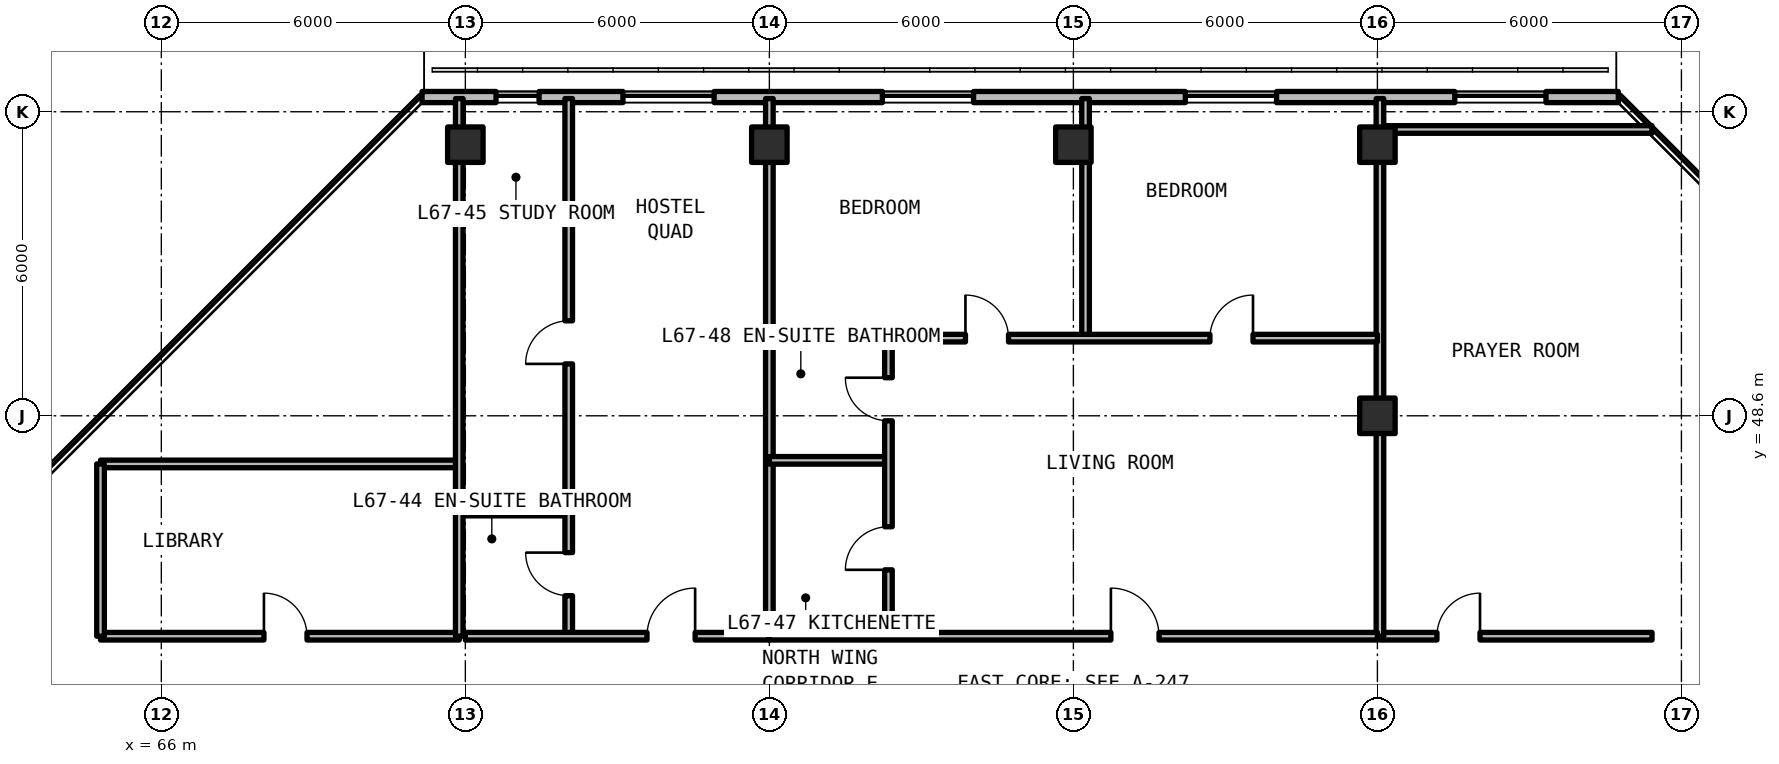
"""IFC4 building model, lengths in metres.
Left out: names, types, materials, properties, quantities, classifications, styles, units other than length and angle.
Written with IfcOpenShell. Run it as: python <this file> out.ifc"""

import sys

from ifc_helpers import new_model, si_unit, direction, frame, frame_2d, origin, origin_2d, place, context, subcontext, project, spatial, rectangle, extrude, element, fill, save


model = new_model("IFC4")
c1 = context("Model", 3, precision=1e-05, world=origin(), true_north=direction((0.0, 1.0)))
c2 = subcontext(c1, "Body", "Model", "MODEL_VIEW")
j1 = project(units=[si_unit("LENGTHUNIT", "METRE"), si_unit("PLANEANGLEUNIT", "RADIAN")], contexts=[c1])
p1 = place(None, origin())
s1 = spatial("IfcSite", under=j1, at=p1, CompositionType="ELEMENT")
p2 = place(p1, origin())
s2 = spatial("IfcBuilding", under=s1, at=p2, CompositionType="ELEMENT")
p3 = place(p2, frame((0.0, 0.0, 239.25)))
s3 = spatial("IfcBuildingStorey", under=s2, at=p3, CompositionType="ELEMENT", Elevation=239.25)
for number, where, z_axis, x_axis in (
    (1, (90.0, 48.6, 0.0), (0.0, 0.0, 1.0), (1.0, 0.0, 0.0)),
    (2, (72.0, 53.95, 0.0), (0.0, 0.0, 1.0), (1.0, 0.0, 0.0)),
    (3, (78.0, 53.95, 0.0), (0.0, 0.0, 1.0), (1.0, 0.0, 0.0)),
    (4, (84.0, 53.95, 0.0), (0.0, 0.0, 1.0), (1.0, 0.0, 0.0)),
    (5, (90.0, 53.95, 0.0), (0.0, 0.0, 1.0), (1.0, 0.0, 0.0)),
):
    element("IfcColumn", number, at=place(p3, frame(where, z_axis=z_axis, x_axis=x_axis)), inside=s3, PredefinedType="COLUMN", context=c2, shape_type="SweptSolid", body=[
        extrude(rectangle(XDim=0.7, YDim=0.7, at=origin_2d()), origin(), (0.0, 0.0, 1.0), 3.3),
    ])
p4 = place(p3, frame((94.754, 54.89, 0.0), z_axis=(0.0, 0.0, 1.0), x_axis=(-1.0, 0.0, 0.0)))
e6 = element("IfcWall", 6, at=p4, inside=s3, PredefinedType="SOLIDWALL", context=c2, shape_type="SweptSolid", body=[
    extrude(rectangle(XDim=23.609, YDim=0.22, at=frame_2d((11.804, 0.0))), origin(), (0.0, 0.0, 1.0), 3.08),
])
p5 = place(p4, frame((1.427, 0.0, 0.78)))
e7 = element("IfcOpeningElement", 7, at=p5, cuts=e6, PredefinedType="OPENING", context=c2, shape_type="SweptSolid", body=[
    extrude(rectangle(XDim=1.8, YDim=1.66, at=frame_2d((0.9, 0.83))), frame((0.0, 0.12, 0.0), z_axis=(0.0, -1.0, 0.0), x_axis=(1.0, 0.0, 0.0)), (0.0, 0.0, 1.0), 0.24),
])
p6 = place(p4, frame((21.299, 0.0, 0.78)))
e8 = element("IfcOpeningElement", 8, at=p6, cuts=e6, PredefinedType="OPENING", context=c2, shape_type="SweptSolid", body=[
    extrude(rectangle(XDim=0.85, YDim=1.65, at=frame_2d((0.425, 0.825))), frame((0.0, 0.12, 0.0), z_axis=(0.0, -1.0, 0.0), x_axis=(1.0, 0.0, 0.0)), (0.0, 0.0, 1.0), 0.24),
])
p7 = place(p4, frame((17.844, 0.0, 0.78)))
e9 = element("IfcOpeningElement", 9, at=p7, cuts=e6, PredefinedType="OPENING", context=c2, shape_type="SweptSolid", body=[
    extrude(rectangle(XDim=1.8, YDim=1.66, at=frame_2d((0.9, 0.83))), frame((0.0, 0.12, 0.0), z_axis=(0.0, -1.0, 0.0), x_axis=(1.0, 0.0, 0.0)), (0.0, 0.0, 1.0), 0.24),
])
p8 = place(p4, frame((12.724, 0.0, 0.78)))
e10 = element("IfcOpeningElement", 10, at=p8, cuts=e6, PredefinedType="OPENING", context=c2, shape_type="SweptSolid", body=[
    extrude(rectangle(XDim=1.8, YDim=1.66, at=frame_2d((0.9, 0.83))), frame((0.0, 0.12, 0.0), z_axis=(0.0, -1.0, 0.0), x_axis=(1.0, 0.0, 0.0)), (0.0, 0.0, 1.0), 0.24),
])
p9 = place(p4, frame((6.744, 0.0, 0.78)))
e11 = element("IfcOpeningElement", 11, at=p9, cuts=e6, PredefinedType="OPENING", context=c2, shape_type="SweptSolid", body=[
    extrude(rectangle(XDim=1.8, YDim=1.66, at=frame_2d((0.9, 0.83))), frame((0.0, 0.12, 0.0), z_axis=(0.0, -1.0, 0.0), x_axis=(1.0, 0.0, 0.0)), (0.0, 0.0, 1.0), 0.24),
])
p10 = place(p3, frame((64.8, 44.25, 0.0), z_axis=(0.0, 0.0, 1.0), x_axis=(1.0, 0.0, 0.0)))
e12 = element("IfcWall", 12, at=p10, inside=s3, PredefinedType="SOLIDWALL", context=c2, shape_type="SweptSolid", body=[
    extrude(rectangle(XDim=7.08, YDim=0.15, at=frame_2d((3.54, 0.0))), origin(), (0.0, 0.0, 1.0), 2.35),
])
p11 = place(p10, frame((3.225, 0.0, 0.0)))
e13 = element("IfcOpeningElement", 13, at=p11, cuts=e12, PredefinedType="OPENING", context=c2, shape_type="SweptSolid", body=[
    extrude(rectangle(XDim=0.85, YDim=2.1, at=frame_2d((0.425, 1.05))), frame((0.0, 0.085, 0.0), z_axis=(0.0, -1.0, 0.0), x_axis=(1.0, 0.0, 0.0)), (0.0, 0.0, 1.0), 0.17),
])
p12 = place(p3, frame((64.8, 47.65, 0.0), z_axis=(0.0, 0.0, 1.0), x_axis=(1.0, 0.0, 0.0)))
e14 = element("IfcWall", 14, at=p12, inside=s3, PredefinedType="SOLIDWALL", context=c2, shape_type="SweptSolid", body=[
    extrude(rectangle(XDim=7.08, YDim=0.15, at=frame_2d((3.54, 0.0))), origin(), (0.0, 0.0, 1.0), 2.35),
])
p13 = place(p3, frame((64.8, 44.25, 0.0), z_axis=(0.0, 0.0, 1.0), x_axis=(0.0, 1.0, 0.0)))
e15 = element("IfcWall", 15, at=p13, inside=s3, PredefinedType="SOLIDWALL", context=c2, shape_type="SweptSolid", body=[
    extrude(rectangle(XDim=3.4, YDim=0.15, at=frame_2d((1.7, 0.0))), origin(), (0.0, 0.0, 1.0), 2.35),
])
p14 = place(p3, frame((71.88, 44.25, 0.0), z_axis=(0.0, 0.0, 1.0), x_axis=(0.0, 1.0, 0.0)))
e16 = element("IfcWall", 16, at=p14, inside=s3, PredefinedType="SOLIDWALL", context=c2, shape_type="SweptSolid", body=[
    extrude(rectangle(XDim=10.61, YDim=0.15, at=frame_2d((5.305, 0.0))), origin(), (0.0, 0.0, 1.0), 2.35),
])
p15 = place(p3, frame((90.05, 44.25, 0.0), z_axis=(0.0, 0.0, 1.0), x_axis=(1.0, 0.0, 0.0)))
e17 = element("IfcWall", 17, at=p15, inside=s3, PredefinedType="SOLIDWALL", context=c2, shape_type="SweptSolid", body=[
    extrude(rectangle(XDim=5.37, YDim=0.15, at=frame_2d((2.685, 0.0))), origin(), (0.0, 0.0, 1.0), 2.35),
])
p16 = place(p15, frame((1.125, 0.0, 0.0)))
e18 = element("IfcOpeningElement", 18, at=p16, cuts=e17, PredefinedType="OPENING", context=c2, shape_type="SweptSolid", body=[
    extrude(rectangle(XDim=0.85, YDim=2.1, at=frame_2d((0.425, 1.05))), frame((0.0, 0.085, 0.0), z_axis=(0.0, -1.0, 0.0), x_axis=(1.0, 0.0, 0.0)), (0.0, 0.0, 1.0), 0.17),
])
p17 = place(p3, frame((90.05, 54.25, 0.0), z_axis=(0.0, 0.0, 1.0), x_axis=(1.0, 0.0, 0.0)))
e19 = element("IfcWall", 19, at=p17, inside=s3, PredefinedType="SOLIDWALL", context=c2, shape_type="SweptSolid", body=[
    extrude(rectangle(XDim=5.37, YDim=0.15, at=frame_2d((2.685, 0.0))), origin(), (0.0, 0.0, 1.0), 2.35),
])
for number, where, z_axis, x_axis in (
    (20, (90.05, 44.25, 0.0), (0.0, 0.0, 1.0), (0.0, 1.0, 0.0)),
    (21, (78.0, 44.25, 0.0), (0.0, 0.0, 1.0), (0.0, 1.0, 0.0)),
):
    element("IfcWall", number, at=place(p3, frame(where, z_axis=z_axis, x_axis=x_axis)), inside=s3, PredefinedType="SOLIDWALL", context=c2, shape_type="SweptSolid", body=[
        extrude(rectangle(XDim=10.61, YDim=0.15, at=frame_2d((5.305, 0.0))), origin(), (0.0, 0.0, 1.0), 2.35),
    ])
p18 = place(p3, frame((72.0, 46.7, 0.0), z_axis=(0.0, 0.0, 1.0), x_axis=(1.0, 0.0, 0.0)))
e22 = element("IfcWall", 22, at=p18, inside=s3, PredefinedType="PARTITIONING", context=c2, shape_type="SweptSolid", body=[
    extrude(rectangle(XDim=2.04, YDim=0.15, at=frame_2d((1.02, 0.0))), origin(), (0.0, 0.0, 1.0), 2.35),
])
p19 = place(p3, frame((74.04, 44.25, 0.0), z_axis=(0.0, 0.0, 1.0), x_axis=(0.0, 1.0, 0.0)))
e23 = element("IfcWall", 23, at=p19, inside=s3, PredefinedType="PARTITIONING", context=c2, shape_type="SweptSolid", body=[
    extrude(rectangle(XDim=10.61, YDim=0.15, at=frame_2d((5.305, 0.0))), origin(), (0.0, 0.0, 1.0), 2.35),
])
p20 = place(p19, frame((0.8, 0.0, 0.0)))
e24 = element("IfcOpeningElement", 24, at=p20, cuts=e23, PredefinedType="OPENING", context=c2, shape_type="SweptSolid", body=[
    extrude(rectangle(XDim=0.85, YDim=2.1, at=frame_2d((0.425, 1.05))), frame((0.0, 0.085, 0.0), z_axis=(0.0, -1.0, 0.0), x_axis=(1.0, 0.0, 0.0)), (0.0, 0.0, 1.0), 0.17),
])
p21 = place(p19, frame((5.374, 0.0, 0.0)))
e25 = element("IfcOpeningElement", 25, at=p21, cuts=e23, PredefinedType="OPENING", context=c2, shape_type="SweptSolid", body=[
    extrude(rectangle(XDim=0.85, YDim=2.1, at=frame_2d((0.425, 1.05))), frame((0.0, 0.085, 0.0), z_axis=(0.0, -1.0, 0.0), x_axis=(1.0, 0.0, 0.0)), (0.0, 0.0, 1.0), 0.17),
])
p22 = place(p3, frame((72.0, 44.25, 0.0), z_axis=(0.0, 0.0, 1.0), x_axis=(1.0, 0.0, 0.0)))
e26 = element("IfcWall", 26, at=p22, inside=s3, PredefinedType="SOLIDWALL", context=c2, shape_type="SweptSolid", body=[
    extrude(rectangle(XDim=6.0, YDim=0.15, at=frame_2d((3.0, 0.0))), origin(), (0.0, 0.0, 1.0), 2.35),
])
p23 = place(p22, frame((3.585, 0.0, 0.0)))
e27 = element("IfcOpeningElement", 27, at=p23, cuts=e26, PredefinedType="OPENING", context=c2, shape_type="SweptSolid", body=[
    extrude(rectangle(XDim=0.95, YDim=2.15, at=frame_2d((0.475, 1.075))), frame((0.0, 0.085, 0.0), z_axis=(0.0, -1.0, 0.0), x_axis=(1.0, 0.0, 0.0)), (0.0, 0.0, 1.0), 0.17),
])
p24 = place(p3, frame((78.0, 47.721, 0.0), z_axis=(0.0, 0.0, 1.0), x_axis=(1.0, 0.0, 0.0)))
e28 = element("IfcWall", 28, at=p24, inside=s3, PredefinedType="PARTITIONING", context=c2, shape_type="SweptSolid", body=[
    extrude(rectangle(XDim=2.35, YDim=0.15, at=frame_2d((1.175, 0.0))), origin(), (0.0, 0.0, 1.0), 2.35),
])
p25 = place(p3, frame((80.35, 44.25, 0.0), z_axis=(0.0, 0.0, 1.0), x_axis=(0.0, 1.0, 0.0)))
e29 = element("IfcWall", 29, at=p25, inside=s3, PredefinedType="PARTITIONING", context=c2, shape_type="SweptSolid", body=[
    extrude(rectangle(XDim=5.882, YDim=0.15, at=frame_2d((2.941, 0.0))), origin(), (0.0, 0.0, 1.0), 2.35),
])
p26 = place(p25, frame((1.31, 0.0, 0.0)))
e30 = element("IfcOpeningElement", 30, at=p26, cuts=e29, PredefinedType="OPENING", context=c2, shape_type="SweptSolid", body=[
    extrude(rectangle(XDim=0.85, YDim=2.1, at=frame_2d((0.425, 1.05))), frame((0.0, 0.085, 0.0), z_axis=(0.0, -1.0, 0.0), x_axis=(1.0, 0.0, 0.0)), (0.0, 0.0, 1.0), 0.17),
])
p27 = place(p25, frame((4.251, 0.0, 0.0)))
e31 = element("IfcOpeningElement", 31, at=p27, cuts=e29, PredefinedType="OPENING", context=c2, shape_type="SweptSolid", body=[
    extrude(rectangle(XDim=0.85, YDim=2.1, at=frame_2d((0.425, 1.05))), frame((0.0, 0.085, 0.0), z_axis=(0.0, -1.0, 0.0), x_axis=(1.0, 0.0, 0.0)), (0.0, 0.0, 1.0), 0.17),
])
p28 = place(p3, frame((84.24, 50.132, 0.0), z_axis=(0.0, 0.0, 1.0), x_axis=(0.0, 1.0, 0.0)))
e32 = element("IfcWall", 32, at=p28, inside=s3, PredefinedType="PARTITIONING", context=c2, shape_type="SweptSolid", body=[
    extrude(rectangle(XDim=4.728, YDim=0.15, at=frame_2d((2.364, 0.0))), origin(), (0.0, 0.0, 1.0), 2.35),
])
p29 = place(p3, frame((78.0, 50.132, 0.0), z_axis=(0.0, 0.0, 1.0), x_axis=(1.0, 0.0, 0.0)))
e33 = element("IfcWall", 33, at=p29, inside=s3, PredefinedType="PARTITIONING", context=c2, shape_type="SweptSolid", body=[
    extrude(rectangle(XDim=12.0, YDim=0.15, at=frame_2d((6.0, 0.0))), origin(), (0.0, 0.0, 1.0), 2.35),
])
p30 = place(p29, frame((3.87, 0.0, 0.0)))
e34 = element("IfcOpeningElement", 34, at=p30, cuts=e33, PredefinedType="OPENING", context=c2, shape_type="SweptSolid", body=[
    extrude(rectangle(XDim=0.85, YDim=2.1, at=frame_2d((0.425, 1.05))), frame((0.0, 0.085, 0.0), z_axis=(0.0, -1.0, 0.0), x_axis=(1.0, 0.0, 0.0)), (0.0, 0.0, 1.0), 0.17),
])
p31 = place(p29, frame((8.695, 0.0, 0.0)))
e35 = element("IfcOpeningElement", 35, at=p31, cuts=e33, PredefinedType="OPENING", context=c2, shape_type="SweptSolid", body=[
    extrude(rectangle(XDim=0.85, YDim=2.1, at=frame_2d((0.425, 1.05))), frame((0.0, 0.085, 0.0), z_axis=(0.0, -1.0, 0.0), x_axis=(1.0, 0.0, 0.0)), (0.0, 0.0, 1.0), 0.17),
])
p32 = place(p3, frame((78.0, 44.25, 0.0), z_axis=(0.0, 0.0, 1.0), x_axis=(1.0, 0.0, 0.0)))
e36 = element("IfcWall", 36, at=p32, inside=s3, PredefinedType="SOLIDWALL", context=c2, shape_type="SweptSolid", body=[
    extrude(rectangle(XDim=12.0, YDim=0.15, at=frame_2d((6.0, 0.0))), origin(), (0.0, 0.0, 1.0), 2.35),
])
p33 = place(p32, frame((6.74, 0.0, 0.0)))
e37 = element("IfcOpeningElement", 37, at=p33, cuts=e36, PredefinedType="OPENING", context=c2, shape_type="SweptSolid", body=[
    extrude(rectangle(XDim=0.95, YDim=2.15, at=frame_2d((0.475, 1.075))), frame((0.0, 0.085, 0.0), z_axis=(0.0, -1.0, 0.0), x_axis=(1.0, 0.0, 0.0)), (0.0, 0.0, 1.0), 0.17),
])
p34 = place(p5, origin())
e38 = element("IfcWindow", 38, at=p34, inside=s3, PartitioningType="SINGLE_PANEL", PredefinedType="WINDOW", context=c2, shape_type="SweptSolid", body=[
    extrude(rectangle(XDim=1.8, YDim=1.66, at=frame_2d((0.9, 0.83))), frame((0.0, 0.03, 0.0), z_axis=(0.0, -1.0, 0.0), x_axis=(1.0, 0.0, 0.0)), (0.0, 0.0, 1.0), 0.06),
])
fill(e7, e38)
p35 = place(p6, origin())
e39 = element("IfcWindow", 39, at=p35, inside=s3, PartitioningType="SINGLE_PANEL", PredefinedType="WINDOW", context=c2, shape_type="SweptSolid", body=[
    extrude(rectangle(XDim=0.85, YDim=1.65, at=frame_2d((0.425, 0.825))), frame((0.0, 0.03, 0.0), z_axis=(0.0, -1.0, 0.0), x_axis=(1.0, 0.0, 0.0)), (0.0, 0.0, 1.0), 0.06),
])
fill(e8, e39)
p36 = place(p7, origin())
e40 = element("IfcWindow", 40, at=p36, inside=s3, PartitioningType="SINGLE_PANEL", PredefinedType="WINDOW", context=c2, shape_type="SweptSolid", body=[
    extrude(rectangle(XDim=1.8, YDim=1.66, at=frame_2d((0.9, 0.83))), frame((0.0, 0.03, 0.0), z_axis=(0.0, -1.0, 0.0), x_axis=(1.0, 0.0, 0.0)), (0.0, 0.0, 1.0), 0.06),
])
fill(e9, e40)
p37 = place(p8, origin())
e41 = element("IfcWindow", 41, at=p37, inside=s3, PartitioningType="SINGLE_PANEL", PredefinedType="WINDOW", context=c2, shape_type="SweptSolid", body=[
    extrude(rectangle(XDim=1.8, YDim=1.66, at=frame_2d((0.9, 0.83))), frame((0.0, 0.03, 0.0), z_axis=(0.0, -1.0, 0.0), x_axis=(1.0, 0.0, 0.0)), (0.0, 0.0, 1.0), 0.06),
])
fill(e10, e41)
p38 = place(p9, origin())
e42 = element("IfcWindow", 42, at=p38, inside=s3, PartitioningType="SINGLE_PANEL", PredefinedType="WINDOW", context=c2, shape_type="SweptSolid", body=[
    extrude(rectangle(XDim=1.8, YDim=1.66, at=frame_2d((0.9, 0.83))), frame((0.0, 0.03, 0.0), z_axis=(0.0, -1.0, 0.0), x_axis=(1.0, 0.0, 0.0)), (0.0, 0.0, 1.0), 0.06),
])
fill(e11, e42)
p39 = place(p11, origin())
e43 = element("IfcDoor", 43, at=p39, inside=s3, OperationType="SINGLE_SWING_LEFT", PredefinedType="DOOR", context=c2, shape_type="SweptSolid", body=[
    extrude(rectangle(XDim=0.85, YDim=2.1, at=frame_2d((0.425, 1.05))), frame((0.0, 0.025, 0.0), z_axis=(0.0, -1.0, 0.0), x_axis=(1.0, 0.0, 0.0)), (0.0, 0.0, 1.0), 0.05),
])
fill(e13, e43)
p40 = place(p16, origin())
e44 = element("IfcDoor", 44, at=p40, inside=s3, OperationType="SINGLE_SWING_RIGHT", PredefinedType="DOOR", context=c2, shape_type="SweptSolid", body=[
    extrude(rectangle(XDim=0.85, YDim=2.1, at=frame_2d((0.425, 1.05))), frame((0.0, 0.025, 0.0), z_axis=(0.0, -1.0, 0.0), x_axis=(1.0, 0.0, 0.0)), (0.0, 0.0, 1.0), 0.05),
])
fill(e18, e44)
p41 = place(p20, origin())
e45 = element("IfcDoor", 45, at=p41, inside=s3, OperationType="SINGLE_SWING_RIGHT", PredefinedType="DOOR", context=c2, shape_type="SweptSolid", body=[
    extrude(rectangle(XDim=0.85, YDim=2.1, at=frame_2d((0.425, 1.05))), frame((0.0, 0.025, 0.0), z_axis=(0.0, -1.0, 0.0), x_axis=(1.0, 0.0, 0.0)), (0.0, 0.0, 1.0), 0.05),
])
fill(e24, e45)
p42 = place(p21, origin())
e46 = element("IfcDoor", 46, at=p42, inside=s3, OperationType="SINGLE_SWING_LEFT", PredefinedType="DOOR", context=c2, shape_type="SweptSolid", body=[
    extrude(rectangle(XDim=0.85, YDim=2.1, at=frame_2d((0.425, 1.05))), frame((0.0, 0.025, 0.0), z_axis=(0.0, -1.0, 0.0), x_axis=(1.0, 0.0, 0.0)), (0.0, 0.0, 1.0), 0.05),
])
fill(e25, e46)
p43 = place(p23, origin())
e47 = element("IfcDoor", 47, at=p43, inside=s3, OperationType="SINGLE_SWING_RIGHT", PredefinedType="DOOR", context=c2, shape_type="SweptSolid", body=[
    extrude(rectangle(XDim=0.95, YDim=2.15, at=frame_2d((0.475, 1.075))), frame((0.0, 0.025, 0.0), z_axis=(0.0, -1.0, 0.0), x_axis=(1.0, 0.0, 0.0)), (0.0, 0.0, 1.0), 0.05),
])
fill(e27, e47)
p44 = place(p26, origin())
e48 = element("IfcDoor", 48, at=p44, inside=s3, OperationType="SINGLE_SWING_LEFT", PredefinedType="DOOR", context=c2, shape_type="SweptSolid", body=[
    extrude(rectangle(XDim=0.85, YDim=2.1, at=frame_2d((0.425, 1.05))), frame((0.0, 0.025, 0.0), z_axis=(0.0, -1.0, 0.0), x_axis=(1.0, 0.0, 0.0)), (0.0, 0.0, 1.0), 0.05),
])
fill(e30, e48)
p45 = place(p27, origin())
e49 = element("IfcDoor", 49, at=p45, inside=s3, OperationType="SINGLE_SWING_RIGHT", PredefinedType="DOOR", context=c2, shape_type="SweptSolid", body=[
    extrude(rectangle(XDim=0.85, YDim=2.1, at=frame_2d((0.425, 1.05))), frame((0.0, 0.025, 0.0), z_axis=(0.0, -1.0, 0.0), x_axis=(1.0, 0.0, 0.0)), (0.0, 0.0, 1.0), 0.05),
])
fill(e31, e49)
p46 = place(p30, origin())
e50 = element("IfcDoor", 50, at=p46, inside=s3, OperationType="SINGLE_SWING_LEFT", PredefinedType="DOOR", context=c2, shape_type="SweptSolid", body=[
    extrude(rectangle(XDim=0.85, YDim=2.1, at=frame_2d((0.425, 1.05))), frame((0.0, 0.025, 0.0), z_axis=(0.0, -1.0, 0.0), x_axis=(1.0, 0.0, 0.0)), (0.0, 0.0, 1.0), 0.05),
])
fill(e34, e50)
p47 = place(p31, origin())
e51 = element("IfcDoor", 51, at=p47, inside=s3, OperationType="SINGLE_SWING_RIGHT", PredefinedType="DOOR", context=c2, shape_type="SweptSolid", body=[
    extrude(rectangle(XDim=0.85, YDim=2.1, at=frame_2d((0.425, 1.05))), frame((0.0, 0.025, 0.0), z_axis=(0.0, -1.0, 0.0), x_axis=(1.0, 0.0, 0.0)), (0.0, 0.0, 1.0), 0.05),
])
fill(e35, e51)
p48 = place(p33, origin())
e52 = element("IfcDoor", 52, at=p48, inside=s3, OperationType="SINGLE_SWING_LEFT", PredefinedType="DOOR", context=c2, shape_type="SweptSolid", body=[
    extrude(rectangle(XDim=0.95, YDim=2.15, at=frame_2d((0.475, 1.075))), frame((0.0, 0.025, 0.0), z_axis=(0.0, -1.0, 0.0), x_axis=(1.0, 0.0, 0.0)), (0.0, 0.0, 1.0), 0.05),
])
fill(e37, e52)
save(model, sys.argv[1])
